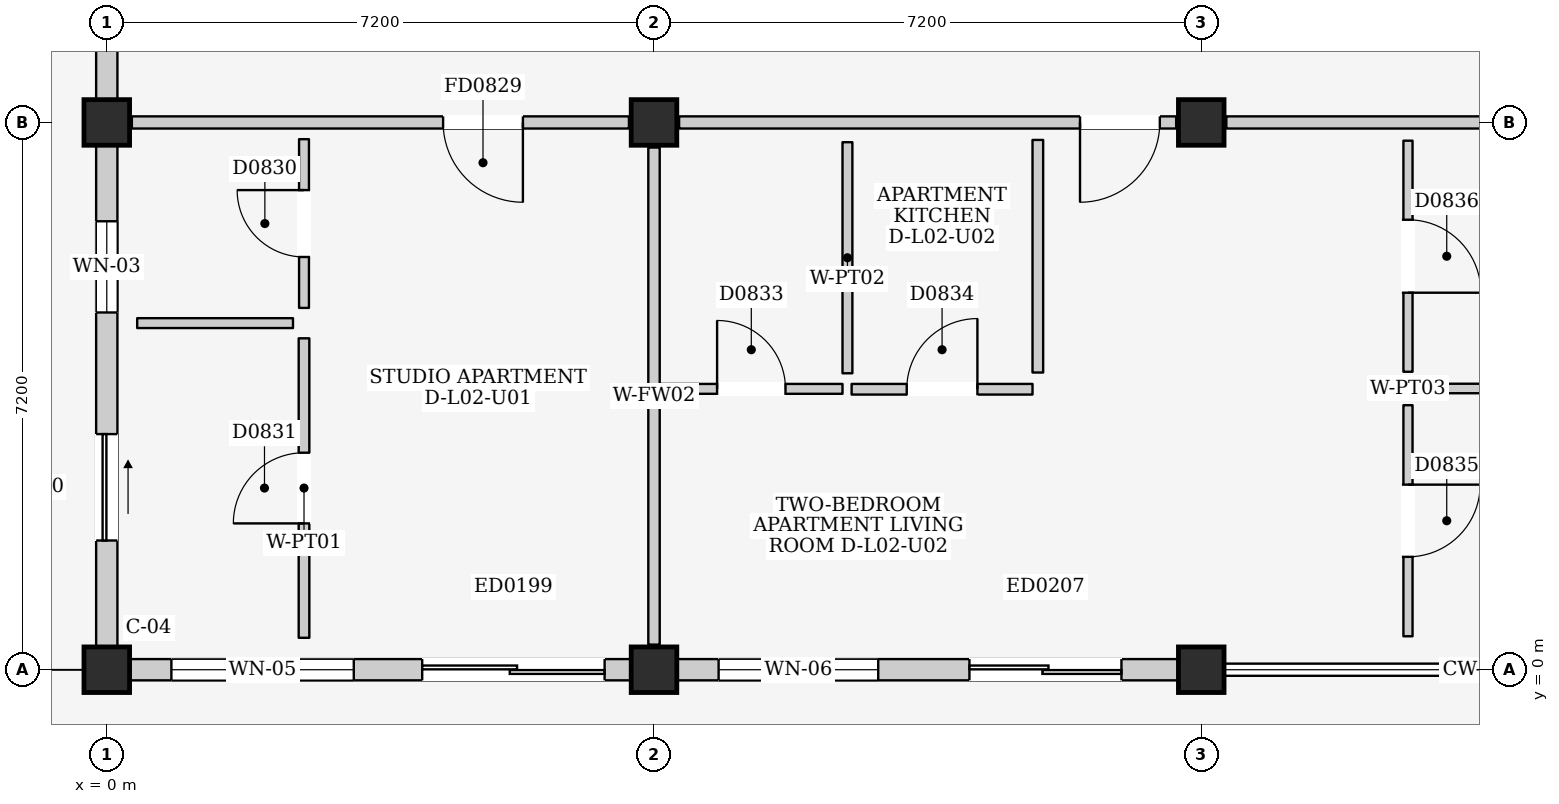
"""IFC4 building model, lengths in metres.
Left out: names, types, materials, properties, quantities, classifications, styles, units other than length and angle.
Written with IfcOpenShell. Run it as: python <this file> out.ifc"""

import sys

from ifc_helpers import new_model, si_unit, direction, frame, frame_2d, origin, origin_2d, place, context, subcontext, project, spatial, rectangle, extrude, element, fill, save


model = new_model("IFC4")
c1 = context("Model", 3, precision=1e-05, world=origin(), true_north=direction((0.0, 1.0)))
c2 = subcontext(c1, "Body", "Model", "MODEL_VIEW")
j1 = project(units=[si_unit("LENGTHUNIT", "METRE"), si_unit("PLANEANGLEUNIT", "RADIAN")], contexts=[c1])
p1 = place(None, origin())
s1 = spatial("IfcSite", under=j1, at=p1, CompositionType="ELEMENT")
p2 = place(p1, origin())
s2 = spatial("IfcBuilding", under=s1, at=p2, CompositionType="ELEMENT")
p3 = place(p2, frame((0.0, 0.0, 9.0)))
s3 = spatial("IfcBuildingStorey", under=s2, at=p3, CompositionType="ELEMENT", Elevation=9.0)
for number, where, z_axis, x_axis in (
    (1, (0.0, 0.0, 0.0), (0.0, 0.0, 1.0), (1.0, 0.0, 0.0)),
    (2, (0.0, 7.2, 0.0), (0.0, 0.0, 1.0), (1.0, 0.0, 0.0)),
    (3, (7.2, 0.0, 0.0), (0.0, 0.0, 1.0), (1.0, 0.0, 0.0)),
    (4, (7.2, 7.2, 0.0), (0.0, 0.0, 1.0), (1.0, 0.0, 0.0)),
    (5, (14.4, 0.0, 0.0), (0.0, 0.0, 1.0), (1.0, 0.0, 0.0)),
    (6, (14.4, 7.2, 0.0), (0.0, 0.0, 1.0), (1.0, 0.0, 0.0)),
):
    element("IfcColumn", number, at=place(p3, frame(where, z_axis=z_axis, x_axis=x_axis)), inside=s3, PredefinedType="COLUMN", context=c2, shape_type="SweptSolid", body=[
        extrude(rectangle(XDim=0.6, YDim=0.6, at=origin_2d()), origin(), (0.0, 0.0, 1.0), 3.2),
    ])
p4 = place(p3, frame((0.3, 0.0, 0.0), z_axis=(0.0, 0.0, 1.0), x_axis=(1.0, 0.0, 0.0)))
e7 = element("IfcWall", 7, at=p4, inside=s3, PredefinedType="ELEMENTEDWALL", context=c2, shape_type="SweptSolid", body=[
    extrude(rectangle(XDim=6.6, YDim=0.28, at=frame_2d((3.3, 0.0))), origin(), (0.0, 0.0, 1.0), 2.425),
])
p5 = place(p4, frame((3.85, 0.0, 0.0)))
e8 = element("IfcOpeningElement", 8, at=p5, cuts=e7, PredefinedType="OPENING", context=c2, shape_type="SweptSolid", body=[
    extrude(rectangle(XDim=2.4, YDim=2.12, at=frame_2d((1.2, 1.06))), frame((0.0, 0.155, 0.0), z_axis=(0.0, -1.0, 0.0), x_axis=(1.0, 0.0, 0.0)), (0.0, 0.0, 1.0), 0.31),
])
p6 = place(p4, frame((0.55, 0.0, 0.665)))
e9 = element("IfcOpeningElement", 9, at=p6, cuts=e7, PredefinedType="OPENING", context=c2, shape_type="SweptSolid", body=[
    extrude(rectangle(XDim=2.4, YDim=1.65, at=frame_2d((1.2, 0.825))), frame((0.0, 0.155, 0.0), z_axis=(0.0, -1.0, 0.0), x_axis=(1.0, 0.0, 0.0)), (0.0, 0.0, 1.0), 0.31),
])
p7 = place(p3, frame((0.0, 0.3, 0.0), z_axis=(0.0, 0.0, 1.0), x_axis=(0.0, 1.0, 0.0)))
e10 = element("IfcWall", 10, at=p7, inside=s3, PredefinedType="ELEMENTEDWALL", context=c2, shape_type="SweptSolid", body=[
    extrude(rectangle(XDim=6.6, YDim=0.28, at=frame_2d((3.3, 0.0))), origin(), (0.0, 0.0, 1.0), 2.425),
])
p8 = place(p7, frame((1.4, 0.0, 0.0)))
e11 = element("IfcOpeningElement", 11, at=p8, cuts=e10, PredefinedType="OPENING", context=c2, shape_type="SweptSolid", body=[
    extrude(rectangle(XDim=1.4, YDim=2.1, at=frame_2d((0.7, 1.05))), frame((0.0, 0.155, 0.0), z_axis=(0.0, -1.0, 0.0), x_axis=(1.0, 0.0, 0.0)), (0.0, 0.0, 1.0), 0.31),
])
p9 = place(p7, frame((4.4, 0.0, 0.95)))
e12 = element("IfcOpeningElement", 12, at=p9, cuts=e10, PredefinedType="OPENING", context=c2, shape_type="SweptSolid", body=[
    extrude(rectangle(XDim=1.2, YDim=1.35, at=frame_2d((0.6, 0.675))), frame((0.0, 0.155, 0.0), z_axis=(0.0, -1.0, 0.0), x_axis=(1.0, 0.0, 0.0)), (0.0, 0.0, 1.0), 0.31),
])
p10 = place(p3, frame((0.0, 7.5, 0.0), z_axis=(0.0, 0.0, 1.0), x_axis=(0.0, 1.0, 0.0)))
e13 = element("IfcWall", 13, at=p10, inside=s3, PredefinedType="ELEMENTEDWALL", context=c2, shape_type="SweptSolid", body=[
    extrude(rectangle(XDim=6.6, YDim=0.28, at=frame_2d((3.3, 0.0))), origin(), (0.0, 0.0, 1.0), 2.425),
])
p11 = place(p10, frame((3.65, 0.0, 0.0)))
e14 = element("IfcOpeningElement", 14, at=p11, cuts=e13, PredefinedType="OPENING", context=c2, shape_type="SweptSolid", body=[
    extrude(rectangle(XDim=1.4, YDim=2.1, at=frame_2d((0.7, 1.05))), frame((0.0, 0.155, 0.0), z_axis=(0.0, -1.0, 0.0), x_axis=(1.0, 0.0, 0.0)), (0.0, 0.0, 1.0), 0.31),
])
p12 = place(p3, frame((7.5, 0.0, 0.0), z_axis=(0.0, 0.0, 1.0), x_axis=(1.0, 0.0, 0.0)))
e15 = element("IfcWall", 15, at=p12, inside=s3, PredefinedType="ELEMENTEDWALL", context=c2, shape_type="SweptSolid", body=[
    extrude(rectangle(XDim=6.6, YDim=0.28, at=frame_2d((3.3, 0.0))), origin(), (0.0, 0.0, 1.0), 2.425),
])
p13 = place(p12, frame((3.85, 0.0, 0.0)))
e16 = element("IfcOpeningElement", 16, at=p13, cuts=e15, PredefinedType="OPENING", context=c2, shape_type="SweptSolid", body=[
    extrude(rectangle(XDim=2.0, YDim=2.12, at=frame_2d((1.0, 1.06))), frame((0.0, 0.155, 0.0), z_axis=(0.0, -1.0, 0.0), x_axis=(1.0, 0.0, 0.0)), (0.0, 0.0, 1.0), 0.31),
])
p14 = place(p12, frame((0.55, 0.0, 0.665)))
e17 = element("IfcOpeningElement", 17, at=p14, cuts=e15, PredefinedType="OPENING", context=c2, shape_type="SweptSolid", body=[
    extrude(rectangle(XDim=2.1, YDim=1.65, at=frame_2d((1.05, 0.825))), frame((0.0, 0.155, 0.0), z_axis=(0.0, -1.0, 0.0), x_axis=(1.0, 0.0, 0.0)), (0.0, 0.0, 1.0), 0.31),
])
p15 = place(p3, frame((0.33, 7.2, 0.0), z_axis=(0.0, 0.0, 1.0), x_axis=(1.0, 0.0, 0.0)))
e18 = element("IfcWall", 18, at=p15, inside=s3, PredefinedType="PARTITIONING", context=c2, shape_type="SweptSolid", body=[
    extrude(rectangle(XDim=6.54, YDim=0.16, at=frame_2d((3.27, 0.0))), origin(), (0.0, 0.0, 1.0), 2.345),
])
p16 = place(p15, frame((4.095, 0.0, 0.0)))
e19 = element("IfcOpeningElement", 19, at=p16, cuts=e18, PredefinedType="OPENING", context=c2, shape_type="SweptSolid", body=[
    extrude(rectangle(XDim=1.05, YDim=2.15, at=frame_2d((0.525, 1.075))), frame((0.0, 0.095, 0.0), z_axis=(0.0, -1.0, 0.0), x_axis=(1.0, 0.0, 0.0)), (0.0, 0.0, 1.0), 0.19),
])
p17 = place(p3, frame((7.2, 0.33, 0.0), z_axis=(0.0, 0.0, 1.0), x_axis=(0.0, 1.0, 0.0)))
e20 = element("IfcWall", 20, at=p17, inside=s3, PredefinedType="PARTITIONING", context=c2, shape_type="SweptSolid", body=[
    extrude(rectangle(XDim=6.54, YDim=0.15, at=frame_2d((3.27, 0.0))), origin(), (0.0, 0.0, 1.0), 2.395),
])
p18 = place(p3, frame((0.4, 4.56, 0.0), z_axis=(0.0, 0.0, 1.0), x_axis=(1.0, 0.0, 0.0)))
e21 = element("IfcWall", 21, at=p18, inside=s3, PredefinedType="PARTITIONING", context=c2, shape_type="SweptSolid", body=[
    extrude(rectangle(XDim=2.05, YDim=0.13, at=frame_2d((1.025, 0.0))), origin(), (0.0, 0.0, 1.0), 2.96),
])
p19 = place(p3, frame((2.595, 4.76, 0.0), z_axis=(0.0, 0.0, 1.0), x_axis=(0.0, 1.0, 0.0)))
e22 = element("IfcWall", 22, at=p19, inside=s3, PredefinedType="PARTITIONING", context=c2, shape_type="SweptSolid", body=[
    extrude(rectangle(XDim=2.22, YDim=0.13, at=frame_2d((1.11, 0.0))), origin(), (0.0, 0.0, 1.0), 2.96),
])
p20 = place(p19, frame((0.67, 0.0, 0.0)))
e23 = element("IfcOpeningElement", 23, at=p20, cuts=e22, PredefinedType="OPENING", context=c2, shape_type="SweptSolid", body=[
    extrude(rectangle(XDim=0.88, YDim=2.1, at=frame_2d((0.44, 1.05))), frame((0.0, 0.08, 0.0), z_axis=(0.0, -1.0, 0.0), x_axis=(1.0, 0.0, 0.0)), (0.0, 0.0, 1.0), 0.16),
])
p21 = place(p3, frame((2.595, 0.42, 0.0), z_axis=(0.0, 0.0, 1.0), x_axis=(0.0, 1.0, 0.0)))
e24 = element("IfcWall", 24, at=p21, inside=s3, PredefinedType="PARTITIONING", context=c2, shape_type="SweptSolid", body=[
    extrude(rectangle(XDim=3.94, YDim=0.14, at=frame_2d((1.97, 0.0))), origin(), (0.0, 0.0, 1.0), 2.96),
])
p22 = place(p21, frame((1.505, 0.0, 0.0)))
e25 = element("IfcOpeningElement", 25, at=p22, cuts=e24, PredefinedType="OPENING", context=c2, shape_type="SweptSolid", body=[
    extrude(rectangle(XDim=0.93, YDim=2.14, at=frame_2d((0.465, 1.07))), frame((0.0, 0.085, 0.0), z_axis=(0.0, -1.0, 0.0), x_axis=(1.0, 0.0, 0.0)), (0.0, 0.0, 1.0), 0.17),
])
p23 = place(p3, frame((7.53, 7.2, 0.0), z_axis=(0.0, 0.0, 1.0), x_axis=(1.0, 0.0, 0.0)))
e26 = element("IfcWall", 26, at=p23, inside=s3, PredefinedType="PARTITIONING", context=c2, shape_type="SweptSolid", body=[
    extrude(rectangle(XDim=6.54, YDim=0.16, at=frame_2d((3.27, 0.0))), origin(), (0.0, 0.0, 1.0), 2.345),
])
p24 = place(p23, frame((5.275, 0.0, 0.0)))
e27 = element("IfcOpeningElement", 27, at=p24, cuts=e26, PredefinedType="OPENING", context=c2, shape_type="SweptSolid", body=[
    extrude(rectangle(XDim=1.05, YDim=2.15, at=frame_2d((0.525, 1.075))), frame((0.0, 0.095, 0.0), z_axis=(0.0, -1.0, 0.0), x_axis=(1.0, 0.0, 0.0)), (0.0, 0.0, 1.0), 0.19),
])
p25 = place(p3, frame((14.73, 7.2, 0.0), z_axis=(0.0, 0.0, 1.0), x_axis=(1.0, 0.0, 0.0)))
e28 = element("IfcWall", 28, at=p25, inside=s3, PredefinedType="PARTITIONING", context=c2, shape_type="SweptSolid", body=[
    extrude(rectangle(XDim=6.54, YDim=0.16, at=frame_2d((3.27, 0.0))), origin(), (0.0, 0.0, 1.0), 2.345),
])
p26 = place(p3, frame((7.28, 3.695, 0.0), z_axis=(0.0, 0.0, 1.0), x_axis=(1.0, 0.0, 0.0)))
e29 = element("IfcWall", 29, at=p26, inside=s3, PredefinedType="PARTITIONING", context=c2, shape_type="SweptSolid", body=[
    extrude(rectangle(XDim=2.4, YDim=0.13, at=frame_2d((1.2, 0.0))), origin(), (0.0, 0.0, 1.0), 2.96),
])
p27 = place(p26, frame((0.75, 0.0, 0.0)))
e30 = element("IfcOpeningElement", 30, at=p27, cuts=e29, PredefinedType="OPENING", context=c2, shape_type="SweptSolid", body=[
    extrude(rectangle(XDim=0.9, YDim=2.1, at=frame_2d((0.45, 1.05))), frame((0.0, 0.08, 0.0), z_axis=(0.0, -1.0, 0.0), x_axis=(1.0, 0.0, 0.0)), (0.0, 0.0, 1.0), 0.16),
])
p28 = place(p3, frame((9.745, 3.9, 0.0), z_axis=(0.0, 0.0, 1.0), x_axis=(0.0, 1.0, 0.0)))
e31 = element("IfcWall", 31, at=p28, inside=s3, PredefinedType="PARTITIONING", context=c2, shape_type="SweptSolid", body=[
    extrude(rectangle(XDim=3.04, YDim=0.13, at=frame_2d((1.52, 0.0))), origin(), (0.0, 0.0, 1.0), 2.96),
])
p29 = place(p3, frame((9.8, 3.69, 0.0), z_axis=(0.0, 0.0, 1.0), x_axis=(1.0, 0.0, 0.0)))
e32 = element("IfcWall", 32, at=p29, inside=s3, PredefinedType="PARTITIONING", context=c2, shape_type="SweptSolid", body=[
    extrude(rectangle(XDim=2.38, YDim=0.14, at=frame_2d((1.19, 0.0))), origin(), (0.0, 0.0, 1.0), 2.96),
])
p30 = place(p29, frame((0.725, 0.0, 0.0)))
e33 = element("IfcOpeningElement", 33, at=p30, cuts=e32, PredefinedType="OPENING", context=c2, shape_type="SweptSolid", body=[
    extrude(rectangle(XDim=0.93, YDim=2.14, at=frame_2d((0.465, 1.07))), frame((0.0, 0.085, 0.0), z_axis=(0.0, -1.0, 0.0), x_axis=(1.0, 0.0, 0.0)), (0.0, 0.0, 1.0), 0.17),
])
p31 = place(p3, frame((12.25, 3.91, 0.0), z_axis=(0.0, 0.0, 1.0), x_axis=(0.0, 1.0, 0.0)))
e34 = element("IfcWall", 34, at=p31, inside=s3, PredefinedType="PARTITIONING", context=c2, shape_type="SweptSolid", body=[
    extrude(rectangle(XDim=3.06, YDim=0.14, at=frame_2d((1.53, 0.0))), origin(), (0.0, 0.0, 1.0), 2.96),
])
p32 = place(p3, frame((17.12, 0.44, 0.0), z_axis=(0.0, 0.0, 1.0), x_axis=(0.0, 1.0, 0.0)))
e35 = element("IfcWall", 35, at=p32, inside=s3, PredefinedType="PARTITIONING", context=c2, shape_type="SweptSolid", body=[
    extrude(rectangle(XDim=3.04, YDim=0.12, at=frame_2d((1.52, 0.0))), origin(), (0.0, 0.0, 1.0), 2.96),
])
p33 = place(p32, frame((1.045, 0.0, 0.0)))
e36 = element("IfcOpeningElement", 36, at=p33, cuts=e35, PredefinedType="OPENING", context=c2, shape_type="SweptSolid", body=[
    extrude(rectangle(XDim=0.95, YDim=2.15, at=frame_2d((0.475, 1.075))), frame((0.0, 0.075, 0.0), z_axis=(0.0, -1.0, 0.0), x_axis=(1.0, 0.0, 0.0)), (0.0, 0.0, 1.0), 0.15),
])
p34 = place(p3, frame((17.32, 3.7, 0.0), z_axis=(0.0, 0.0, 1.0), x_axis=(1.0, 0.0, 0.0)))
e37 = element("IfcWall", 37, at=p34, inside=s3, PredefinedType="PARTITIONING", context=c2, shape_type="SweptSolid", body=[
    extrude(rectangle(XDim=4.06, YDim=0.125, at=frame_2d((2.03, 0.0))), origin(), (0.0, 0.0, 1.0), 2.96),
])
p35 = place(p3, frame((17.12, 3.92, 0.0), z_axis=(0.0, 0.0, 1.0), x_axis=(0.0, 1.0, 0.0)))
e38 = element("IfcWall", 38, at=p35, inside=s3, PredefinedType="PARTITIONING", context=c2, shape_type="SweptSolid", body=[
    extrude(rectangle(XDim=3.04, YDim=0.12, at=frame_2d((1.52, 0.0))), origin(), (0.0, 0.0, 1.0), 2.96),
])
p36 = place(p35, frame((1.04, 0.0, 0.0)))
e39 = element("IfcOpeningElement", 39, at=p36, cuts=e38, PredefinedType="OPENING", context=c2, shape_type="SweptSolid", body=[
    extrude(rectangle(XDim=0.96, YDim=2.15, at=frame_2d((0.48, 1.075))), frame((0.0, 0.075, 0.0), z_axis=(0.0, -1.0, 0.0), x_axis=(1.0, 0.0, 0.0)), (0.0, 0.0, 1.0), 0.15),
])
p37 = place(p5, frame((2.4, 0.0, 0.0), z_axis=(0.0, 0.0, 1.0), x_axis=(-1.0, 0.0, 0.0)))
e40 = element("IfcDoor", 40, at=p37, inside=s3, OperationType="DOUBLE_DOOR_SLIDING", PredefinedType="DOOR", context=c2, shape_type="SweptSolid", body=[
    extrude(rectangle(XDim=2.4, YDim=2.12, at=frame_2d((1.2, 1.06))), frame((0.0, 0.025, 0.0), z_axis=(0.0, -1.0, 0.0), x_axis=(1.0, 0.0, 0.0)), (0.0, 0.0, 1.0), 0.05),
])
fill(e8, e40)
p38 = place(p6, origin())
e41 = element("IfcWindow", 41, at=p38, inside=s3, PartitioningType="TRIPLE_PANEL_VERTICAL", PredefinedType="WINDOW", context=c2, shape_type="SweptSolid", body=[
    extrude(rectangle(XDim=2.4, YDim=1.65, at=frame_2d((1.2, 0.825))), frame((0.0, 0.03, 0.0), z_axis=(0.0, -1.0, 0.0), x_axis=(1.0, 0.0, 0.0)), (0.0, 0.0, 1.0), 0.06),
])
fill(e9, e41)
p39 = place(p8, frame((1.4, 0.0, 0.0), z_axis=(0.0, 0.0, 1.0), x_axis=(-1.0, 0.0, 0.0)))
e42 = element("IfcDoor", 42, at=p39, inside=s3, OperationType="SLIDING_TO_RIGHT", PredefinedType="DOOR", context=c2, shape_type="SweptSolid", body=[
    extrude(rectangle(XDim=1.4, YDim=2.1, at=frame_2d((0.7, 1.05))), frame((0.0, 0.025, 0.0), z_axis=(0.0, -1.0, 0.0), x_axis=(1.0, 0.0, 0.0)), (0.0, 0.0, 1.0), 0.05),
])
fill(e11, e42)
p40 = place(p9, origin())
e43 = element("IfcWindow", 43, at=p40, inside=s3, PartitioningType="SINGLE_PANEL", PredefinedType="WINDOW", context=c2, shape_type="SweptSolid", body=[
    extrude(rectangle(XDim=1.2, YDim=1.35, at=frame_2d((0.6, 0.675))), frame((0.0, 0.03, 0.0), z_axis=(0.0, -1.0, 0.0), x_axis=(1.0, 0.0, 0.0)), (0.0, 0.0, 1.0), 0.06),
])
fill(e12, e43)
p41 = place(p13, frame((2.0, 0.0, 0.0), z_axis=(0.0, 0.0, 1.0), x_axis=(-1.0, 0.0, 0.0)))
e44 = element("IfcDoor", 44, at=p41, inside=s3, OperationType="DOUBLE_DOOR_SLIDING", PredefinedType="DOOR", context=c2, shape_type="SweptSolid", body=[
    extrude(rectangle(XDim=2.0, YDim=2.12, at=frame_2d((1.0, 1.06))), frame((0.0, 0.025, 0.0), z_axis=(0.0, -1.0, 0.0), x_axis=(1.0, 0.0, 0.0)), (0.0, 0.0, 1.0), 0.05),
])
fill(e16, e44)
p42 = place(p14, origin())
e45 = element("IfcWindow", 45, at=p42, inside=s3, PartitioningType="DOUBLE_PANEL_VERTICAL", PredefinedType="WINDOW", context=c2, shape_type="SweptSolid", body=[
    extrude(rectangle(XDim=2.1, YDim=1.65, at=frame_2d((1.05, 0.825))), frame((0.0, 0.03, 0.0), z_axis=(0.0, -1.0, 0.0), x_axis=(1.0, 0.0, 0.0)), (0.0, 0.0, 1.0), 0.06),
])
fill(e17, e45)
p43 = place(p16, frame((1.05, 0.0, 0.0), z_axis=(0.0, 0.0, 1.0), x_axis=(-1.0, 0.0, 0.0)))
e46 = element("IfcDoor", 46, at=p43, inside=s3, OperationType="SINGLE_SWING_LEFT", PredefinedType="DOOR", context=c2, shape_type="SweptSolid", body=[
    extrude(rectangle(XDim=1.05, YDim=2.15, at=frame_2d((0.525, 1.075))), frame((0.0, 0.025, 0.0), z_axis=(0.0, -1.0, 0.0), x_axis=(1.0, 0.0, 0.0)), (0.0, 0.0, 1.0), 0.05),
])
fill(e19, e46)
p44 = place(p20, origin())
e47 = element("IfcDoor", 47, at=p44, inside=s3, OperationType="SINGLE_SWING_RIGHT", PredefinedType="DOOR", context=c2, shape_type="SweptSolid", body=[
    extrude(rectangle(XDim=0.88, YDim=2.1, at=frame_2d((0.44, 1.05))), frame((0.0, 0.025, 0.0), z_axis=(0.0, -1.0, 0.0), x_axis=(1.0, 0.0, 0.0)), (0.0, 0.0, 1.0), 0.05),
])
fill(e23, e47)
p45 = place(p22, origin())
e48 = element("IfcDoor", 48, at=p45, inside=s3, OperationType="SINGLE_SWING_LEFT", PredefinedType="DOOR", context=c2, shape_type="SweptSolid", body=[
    extrude(rectangle(XDim=0.93, YDim=2.14, at=frame_2d((0.465, 1.07))), frame((0.0, 0.025, 0.0), z_axis=(0.0, -1.0, 0.0), x_axis=(1.0, 0.0, 0.0)), (0.0, 0.0, 1.0), 0.05),
])
fill(e25, e48)
p46 = place(p24, frame((1.05, 0.0, 0.0), z_axis=(0.0, 0.0, 1.0), x_axis=(-1.0, 0.0, 0.0)))
e49 = element("IfcDoor", 49, at=p46, inside=s3, OperationType="SINGLE_SWING_RIGHT", PredefinedType="DOOR", context=c2, shape_type="SweptSolid", body=[
    extrude(rectangle(XDim=1.05, YDim=2.15, at=frame_2d((0.525, 1.075))), frame((0.0, 0.025, 0.0), z_axis=(0.0, -1.0, 0.0), x_axis=(1.0, 0.0, 0.0)), (0.0, 0.0, 1.0), 0.05),
])
fill(e27, e49)
p47 = place(p27, origin())
e50 = element("IfcDoor", 50, at=p47, inside=s3, OperationType="SINGLE_SWING_LEFT", PredefinedType="DOOR", context=c2, shape_type="SweptSolid", body=[
    extrude(rectangle(XDim=0.9, YDim=2.1, at=frame_2d((0.45, 1.05))), frame((0.0, 0.025, 0.0), z_axis=(0.0, -1.0, 0.0), x_axis=(1.0, 0.0, 0.0)), (0.0, 0.0, 1.0), 0.05),
])
fill(e30, e50)
p48 = place(p30, origin())
e51 = element("IfcDoor", 51, at=p48, inside=s3, OperationType="SINGLE_SWING_RIGHT", PredefinedType="DOOR", context=c2, shape_type="SweptSolid", body=[
    extrude(rectangle(XDim=0.93, YDim=2.14, at=frame_2d((0.465, 1.07))), frame((0.0, 0.025, 0.0), z_axis=(0.0, -1.0, 0.0), x_axis=(1.0, 0.0, 0.0)), (0.0, 0.0, 1.0), 0.05),
])
fill(e33, e51)
p49 = place(p33, frame((0.95, 0.0, 0.0), z_axis=(0.0, 0.0, 1.0), x_axis=(-1.0, 0.0, 0.0)))
e52 = element("IfcDoor", 52, at=p49, inside=s3, OperationType="SINGLE_SWING_LEFT", PredefinedType="DOOR", context=c2, shape_type="SweptSolid", body=[
    extrude(rectangle(XDim=0.95, YDim=2.15, at=frame_2d((0.475, 1.075))), frame((0.0, 0.025, 0.0), z_axis=(0.0, -1.0, 0.0), x_axis=(1.0, 0.0, 0.0)), (0.0, 0.0, 1.0), 0.05),
])
fill(e36, e52)
p50 = place(p36, frame((0.96, 0.0, 0.0), z_axis=(0.0, 0.0, 1.0), x_axis=(-1.0, 0.0, 0.0)))
e53 = element("IfcDoor", 53, at=p50, inside=s3, OperationType="SINGLE_SWING_RIGHT", PredefinedType="DOOR", context=c2, shape_type="SweptSolid", body=[
    extrude(rectangle(XDim=0.96, YDim=2.15, at=frame_2d((0.48, 1.075))), frame((0.0, 0.025, 0.0), z_axis=(0.0, -1.0, 0.0), x_axis=(1.0, 0.0, 0.0)), (0.0, 0.0, 1.0), 0.05),
])
fill(e39, e53)
save(model, sys.argv[1])
